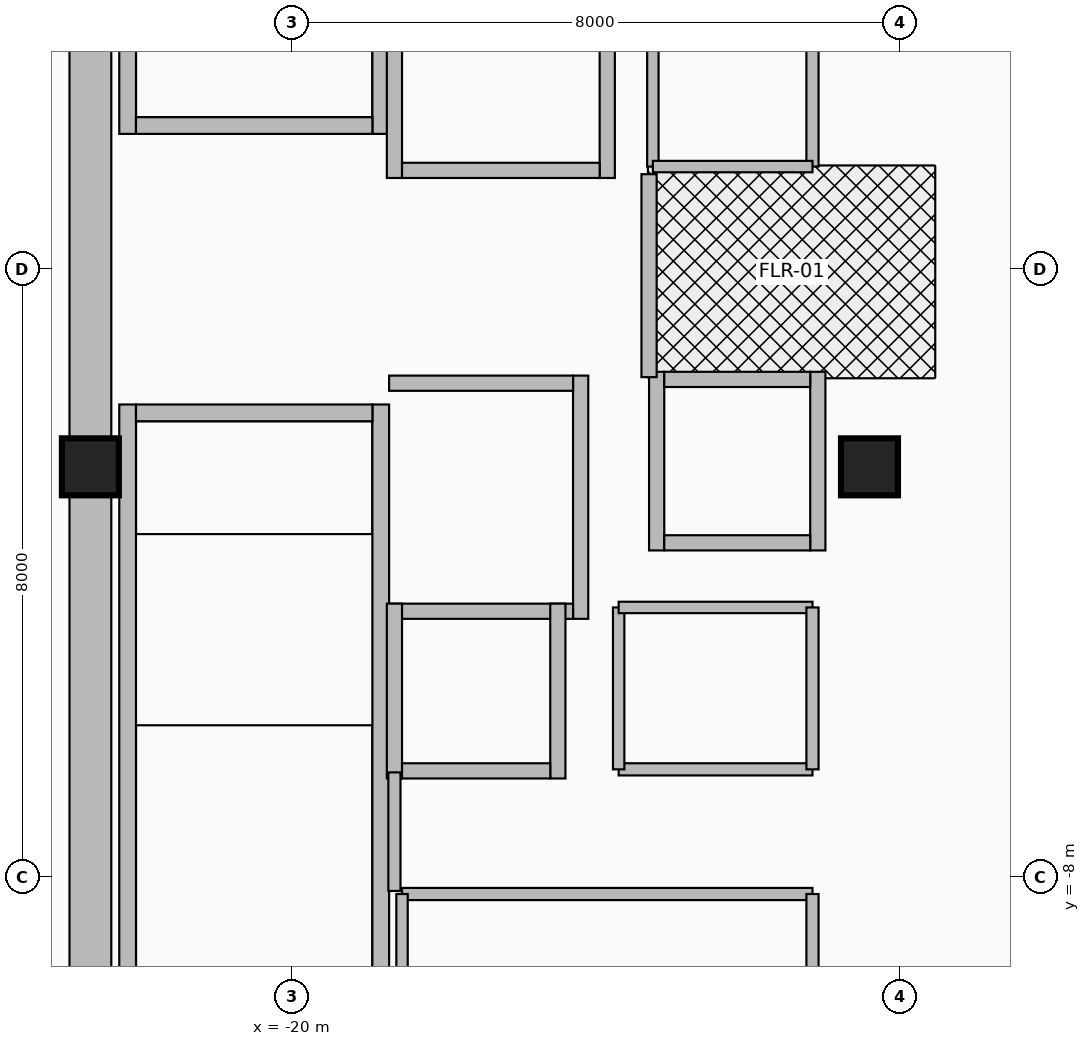
"""IFC4 building model, lengths in metres.
Left out: names, types, materials, properties, quantities, classifications, styles, units other than length and angle.
Written with IfcOpenShell. Run it as: python <this file> out.ifc"""

import sys

from ifc_helpers import new_model, si_unit, direction, frame, frame_2d, origin, origin_2d, place, context, subcontext, project, spatial, rectangle, extrude, source, transform, mapped, element, fill, save


model = new_model("IFC4")
c1 = context("Model", 3, precision=1e-05, world=origin(), true_north=direction((0.0, 1.0)))
c2 = subcontext(c1, "Body", "Model", "MODEL_VIEW")
j1 = project(units=[si_unit("LENGTHUNIT", "METRE"), si_unit("PLANEANGLEUNIT", "RADIAN")], contexts=[c1])
p1 = place(None, origin())
s1 = spatial("IfcSite", under=j1, at=p1, CompositionType="ELEMENT")
p2 = place(p1, origin())
s2 = spatial("IfcBuilding", under=s1, at=p2, CompositionType="ELEMENT")
p3 = place(p2, frame((0.0, 0.0, 290.6)))
s3 = spatial("IfcBuildingStorey", under=s2, at=p3, CompositionType="ELEMENT", Elevation=290.6)
for number, where, z_axis, x_axis in (
    (1, (-22.16, 1.78, 0.0), (0.0, 0.0, 1.0), (0.0, 1.0, 0.0)),
    (2, (-18.83, 1.78, 0.0), (0.0, 0.0, 1.0), (0.0, 1.0, 0.0)),
):
    element("IfcWall", number, at=place(p3, frame(where, z_axis=z_axis, x_axis=x_axis)), inside=s3, PredefinedType="SHEAR", context=c2, shape_type="SweptSolid", body=[
        extrude(rectangle(XDim=8.745, YDim=0.22, at=frame_2d((4.373, 0.0))), origin(), (0.0, 0.0, 1.0), 3.36),
    ])
p4 = place(p3, frame((-22.05, 1.89, 0.0), z_axis=(0.0, 0.0, 1.0), x_axis=(1.0, 0.0, 0.0)))
e3 = element("IfcWall", 3, at=p4, inside=s3, PredefinedType="SHEAR", context=c2, shape_type="SweptSolid", body=[
    extrude(rectangle(XDim=3.11, YDim=0.22, at=frame_2d((1.555, 0.0))), origin(), (0.0, 0.0, 1.0), 3.36),
])
p5 = place(p4, frame((1.0, 0.0, 0.0)))
e4 = element("IfcOpeningElement", 4, at=p5, cuts=e3, PredefinedType="OPENING", context=c2, shape_type="SweptSolid", body=[
    extrude(rectangle(XDim=1.1, YDim=2.15, at=frame_2d((0.55, 1.075))), frame((0.0, 0.125, 0.0), z_axis=(0.0, -1.0, 0.0), x_axis=(1.0, 0.0, 0.0)), (0.0, 0.0, 1.0), 0.25),
])
for number, where, z_axis, x_axis in (
    (5, (-22.16, -10.525, 0.0), (0.0, 0.0, 1.0), (0.0, 1.0, 0.0)),
    (6, (-18.83, -10.525, 0.0), (0.0, 0.0, 1.0), (0.0, 1.0, 0.0)),
):
    element("IfcWall", number, at=place(p3, frame(where, z_axis=z_axis, x_axis=x_axis)), inside=s3, PredefinedType="SHEAR", context=c2, shape_type="SweptSolid", body=[
        extrude(rectangle(XDim=8.745, YDim=0.22, at=frame_2d((4.373, 0.0))), origin(), (0.0, 0.0, 1.0), 3.36),
    ])
p6 = place(p3, frame((-22.05, -1.89, 0.0), z_axis=(0.0, 0.0, 1.0), x_axis=(1.0, 0.0, 0.0)))
e7 = element("IfcWall", 7, at=p6, inside=s3, PredefinedType="SHEAR", context=c2, shape_type="SweptSolid", body=[
    extrude(rectangle(XDim=3.11, YDim=0.22, at=frame_2d((1.555, 0.0))), origin(), (0.0, 0.0, 1.0), 3.36),
])
p7 = place(p6, frame((1.0, 0.0, 0.0)))
e8 = element("IfcOpeningElement", 8, at=p7, cuts=e7, PredefinedType="OPENING", context=c2, shape_type="SweptSolid", body=[
    extrude(rectangle(XDim=1.1, YDim=2.15, at=frame_2d((0.55, 1.075))), frame((0.0, 0.125, 0.0), z_axis=(0.0, -1.0, 0.0), x_axis=(1.0, 0.0, 0.0)), (0.0, 0.0, 1.0), 0.25),
])
p8 = place(p3, frame((-22.65, -11.075, 0.0), z_axis=(0.0, 0.0, 1.0), x_axis=(0.0, 1.0, 0.0)))
e9 = element("IfcWall", 9, at=p8, inside=s3, PredefinedType="SHEAR", context=c2, shape_type="SweptSolid", body=[
    extrude(rectangle(XDim=22.15, YDim=0.55, at=frame_2d((11.075, 0.0))), origin(), (0.0, 0.0, 1.0), 3.36),
])
m1 = source(origin(), c2, "Body", "SweptSolid", [
    extrude(rectangle(XDim=0.75, YDim=0.75, at=origin_2d()), origin(), (0.0, 0.0, 1.0), 3.6),
])
for number, where, z_axis, x_axis in (
    (10, (-22.65, -2.6, 0.0), (0.0, 0.0, 1.0), (1.0, 0.0, 0.0)),
    (11, (-12.4, -2.6, 0.0), (0.0, 0.0, 1.0), (1.0, 0.0, 0.0)),
):
    element("IfcColumn", number, at=place(p3, frame(where, z_axis=z_axis, x_axis=x_axis)), inside=s3, PredefinedType="COLUMN", context=c2, shape_type="MappedRepresentation", body=[
        mapped(m1, transform((0.0, 0.0, 0.0), x_axis=(1.0, 0.0, 0.0), y_axis=(0.0, 1.0, 0.0), z_axis=(0.0, 0.0, 1.0), scale=1.0)),
    ])
for number, where, z_axis, x_axis in (
    (12, (-18.65, 1.2, 0.0), (0.0, 0.0, 1.0), (0.0, 1.0, 0.0)),
    (13, (-15.85, 1.2, 0.0), (0.0, 0.0, 1.0), (0.0, 1.0, 0.0)),
):
    element("IfcWall", number, at=place(p3, frame(where, z_axis=z_axis, x_axis=x_axis)), inside=s3, PredefinedType="MOVABLE", context=c2, shape_type="SweptSolid", body=[
        extrude(rectangle(XDim=3.225, YDim=0.2, at=frame_2d((1.613, 0.0))), origin(), (0.0, 0.0, 1.0), 3.36),
    ])
p9 = place(p3, frame((-18.55, 1.3, 0.0), z_axis=(0.0, 0.0, 1.0), x_axis=(1.0, 0.0, 0.0)))
e14 = element("IfcWall", 14, at=p9, inside=s3, PredefinedType="MOVABLE", context=c2, shape_type="SweptSolid", body=[
    extrude(rectangle(XDim=2.6, YDim=0.2, at=frame_2d((1.3, 0.0))), origin(), (0.0, 0.0, 1.0), 3.36),
])
p10 = place(p9, frame((0.7, 0.0, 0.0)))
e15 = element("IfcOpeningElement", 15, at=p10, cuts=e14, PredefinedType="OPENING", context=c2, shape_type="SweptSolid", body=[
    extrude(rectangle(XDim=1.2, YDim=2.1, at=frame_2d((0.6, 1.05))), frame((0.0, 0.115, 0.0), z_axis=(0.0, -1.0, 0.0), x_axis=(1.0, 0.0, 0.0)), (0.0, 0.0, 1.0), 0.23),
])
p11 = place(p3, frame((-16.2, -4.6, 0.0), z_axis=(0.0, 0.0, 1.0), x_axis=(0.0, 1.0, 0.0)))
e16 = element("IfcWall", 16, at=p11, inside=s3, PredefinedType="MOVABLE", context=c2, shape_type="SweptSolid", body=[
    extrude(rectangle(XDim=3.2, YDim=0.2, at=frame_2d((1.6, 0.0))), origin(), (0.0, 0.0, 1.0), 3.36),
])
p12 = place(p3, frame((-18.72, -4.5, 0.0), z_axis=(0.0, 0.0, 1.0), x_axis=(1.0, 0.0, 0.0)))
e17 = element("IfcWall", 17, at=p12, inside=s3, PredefinedType="MOVABLE", context=c2, shape_type="SweptSolid", body=[
    extrude(rectangle(XDim=2.42, YDim=0.2, at=frame_2d((1.21, 0.0))), origin(), (0.0, 0.0, 1.0), 3.36),
])
p13 = place(p3, frame((-18.72, -1.5, 0.0), z_axis=(0.0, 0.0, 1.0), x_axis=(1.0, 0.0, 0.0)))
e18 = element("IfcWall", 18, at=p13, inside=s3, PredefinedType="MOVABLE", context=c2, shape_type="SweptSolid", body=[
    extrude(rectangle(XDim=2.42, YDim=0.2, at=frame_2d((1.21, 0.0))), origin(), (0.0, 0.0, 1.0), 3.36),
])
p14 = place(p13, frame((0.61, 0.0, 0.0)))
e19 = element("IfcOpeningElement", 19, at=p14, cuts=e18, PredefinedType="OPENING", context=c2, shape_type="SweptSolid", body=[
    extrude(rectangle(XDim=1.2, YDim=2.1, at=frame_2d((0.6, 1.05))), frame((0.0, 0.115, 0.0), z_axis=(0.0, -1.0, 0.0), x_axis=(1.0, 0.0, 0.0)), (0.0, 0.0, 1.0), 0.23),
])
for number, where, z_axis, x_axis in (
    (20, (-18.65, -6.7, 0.0), (0.0, 0.0, 1.0), (0.0, 1.0, 0.0)),
    (21, (-16.5, -6.7, 0.0), (0.0, 0.0, 1.0), (0.0, 1.0, 0.0)),
):
    element("IfcWall", number, at=place(p3, frame(where, z_axis=z_axis, x_axis=x_axis)), inside=s3, PredefinedType="MOVABLE", context=c2, shape_type="SweptSolid", body=[
        extrude(rectangle(XDim=2.3, YDim=0.2, at=frame_2d((1.15, 0.0))), origin(), (0.0, 0.0, 1.0), 3.36),
    ])
p15 = place(p3, frame((-18.55, -6.6, 0.0), z_axis=(0.0, 0.0, 1.0), x_axis=(1.0, 0.0, 0.0)))
e22 = element("IfcWall", 22, at=p15, inside=s3, PredefinedType="MOVABLE", context=c2, shape_type="SweptSolid", body=[
    extrude(rectangle(XDim=1.95, YDim=0.2, at=frame_2d((0.975, 0.0))), origin(), (0.0, 0.0, 1.0), 3.36),
])
p16 = place(p15, frame((0.425, 0.0, 0.0)))
e23 = element("IfcOpeningElement", 23, at=p16, cuts=e22, PredefinedType="OPENING", context=c2, shape_type="SweptSolid", body=[
    extrude(rectangle(XDim=1.1, YDim=2.1, at=frame_2d((0.55, 1.05))), frame((0.0, 0.115, 0.0), z_axis=(0.0, -1.0, 0.0), x_axis=(1.0, 0.0, 0.0)), (0.0, 0.0, 1.0), 0.23),
])
for number, where, z_axis, x_axis in (
    (24, (-15.2, -3.7, 0.0), (0.0, 0.0, 1.0), (0.0, 1.0, 0.0)),
    (25, (-13.08, -3.7, 0.0), (0.0, 0.0, 1.0), (0.0, 1.0, 0.0)),
):
    element("IfcWall", number, at=place(p3, frame(where, z_axis=z_axis, x_axis=x_axis)), inside=s3, PredefinedType="MOVABLE", context=c2, shape_type="SweptSolid", body=[
        extrude(rectangle(XDim=2.35, YDim=0.2, at=frame_2d((1.175, 0.0))), origin(), (0.0, 0.0, 1.0), 3.36),
    ])
p17 = place(p3, frame((-15.1, -3.6, 0.0), z_axis=(0.0, 0.0, 1.0), x_axis=(1.0, 0.0, 0.0)))
e26 = element("IfcWall", 26, at=p17, inside=s3, PredefinedType="MOVABLE", context=c2, shape_type="SweptSolid", body=[
    extrude(rectangle(XDim=1.92, YDim=0.2, at=frame_2d((0.96, 0.0))), origin(), (0.0, 0.0, 1.0), 3.36),
])
p18 = place(p3, frame((-15.1, -1.45, 0.0), z_axis=(0.0, 0.0, 1.0), x_axis=(1.0, 0.0, 0.0)))
e27 = element("IfcWall", 27, at=p18, inside=s3, PredefinedType="MOVABLE", context=c2, shape_type="SweptSolid", body=[
    extrude(rectangle(XDim=1.92, YDim=0.2, at=frame_2d((0.96, 0.0))), origin(), (0.0, 0.0, 1.0), 3.36),
])
p19 = place(p18, frame((0.41, 0.0, 0.0)))
e28 = element("IfcOpeningElement", 28, at=p19, cuts=e27, PredefinedType="OPENING", context=c2, shape_type="SweptSolid", body=[
    extrude(rectangle(XDim=1.1, YDim=2.1, at=frame_2d((0.55, 1.05))), frame((0.0, 0.115, 0.0), z_axis=(0.0, -1.0, 0.0), x_axis=(1.0, 0.0, 0.0)), (0.0, 0.0, 1.0), 0.23),
])
p20 = place(p3, frame((-15.3, -1.42, 0.0), z_axis=(0.0, 0.0, 1.0), x_axis=(0.0, 1.0, 0.0)))
e29 = element("IfcWall", 29, at=p20, inside=s3, PredefinedType="PARTITIONING", context=c2, shape_type="SweptSolid", body=[
    extrude(rectangle(XDim=2.67, YDim=0.2, at=frame_2d((1.335, 0.0))), origin(), (0.0, 0.0, 1.0), 3.36),
])
p21 = place(p20, frame((0.78, 0.0, 0.0)))
e30 = element("IfcOpeningElement", 30, at=p21, cuts=e29, PredefinedType="OPENING", context=c2, shape_type="SweptSolid", body=[
    extrude(rectangle(XDim=1.05, YDim=2.15, at=frame_2d((0.525, 1.075))), frame((0.0, 0.115, 0.0), z_axis=(0.0, -1.0, 0.0), x_axis=(1.0, 0.0, 0.0)), (0.0, 0.0, 1.0), 0.23),
])
p22 = place(p3, frame((-18.65, -8.18, 0.0), z_axis=(0.0, 0.0, 1.0), x_axis=(0.0, 1.0, 0.0)))
e31 = element("IfcWall", 31, at=p22, inside=s3, PredefinedType="PARTITIONING", context=c2, shape_type="SweptSolid", body=[
    extrude(rectangle(XDim=1.56, YDim=0.16, at=frame_2d((0.78, 0.0))), origin(), (0.0, 0.0, 1.0), 3.36),
])
p23 = place(p3, frame((-18.55, -8.22, 0.0), z_axis=(0.0, 0.0, 1.0), x_axis=(1.0, 0.0, 0.0)))
e32 = element("IfcWall", 32, at=p23, inside=s3, PredefinedType="PARTITIONING", context=c2, shape_type="SweptSolid", body=[
    extrude(rectangle(XDim=5.4, YDim=0.16, at=frame_2d((2.7, 0.0))), origin(), (0.0, 0.0, 1.0), 3.36),
])
p24 = place(p23, frame((1.15, 0.0, 0.0)))
e33 = element("IfcOpeningElement", 33, at=p24, cuts=e32, PredefinedType="OPENING", context=c2, shape_type="SweptSolid", body=[
    extrude(rectangle(XDim=0.95, YDim=2.15, at=frame_2d((0.475, 1.075))), frame((0.0, 0.095, 0.0), z_axis=(0.0, -1.0, 0.0), x_axis=(1.0, 0.0, 0.0)), (0.0, 0.0, 1.0), 0.19),
])
p25 = place(p3, frame((-18.55, -10.35, 0.0), z_axis=(0.0, 0.0, 1.0), x_axis=(0.0, 1.0, 0.0)))
e34 = element("IfcWall", 34, at=p25, inside=s3, PredefinedType="PARTITIONING", context=c2, shape_type="SweptSolid", body=[
    extrude(rectangle(XDim=2.13, YDim=0.15, at=frame_2d((1.065, 0.0))), origin(), (0.0, 0.0, 1.0), 3.36),
])
p26 = place(p3, frame((-13.15, -10.35, 0.0), z_axis=(0.0, 0.0, 1.0), x_axis=(0.0, 1.0, 0.0)))
e35 = element("IfcWall", 35, at=p26, inside=s3, PredefinedType="PARTITIONING", context=c2, shape_type="SweptSolid", body=[
    extrude(rectangle(XDim=2.13, YDim=0.16, at=frame_2d((1.065, 0.0))), origin(), (0.0, 0.0, 1.0), 3.36),
])
p27 = place(p3, frame((-15.7, -6.58, 0.0), z_axis=(0.0, 0.0, 1.0), x_axis=(1.0, 0.0, 0.0)))
e36 = element("IfcWall", 36, at=p27, inside=s3, PredefinedType="PARTITIONING", context=c2, shape_type="SweptSolid", body=[
    extrude(rectangle(XDim=2.55, YDim=0.16, at=frame_2d((1.275, 0.0))), origin(), (0.0, 0.0, 1.0), 3.36),
])
p28 = place(p27, frame((0.5, 0.0, 0.0)))
e37 = element("IfcOpeningElement", 37, at=p28, cuts=e36, PredefinedType="OPENING", context=c2, shape_type="SweptSolid", body=[
    extrude(rectangle(XDim=0.85, YDim=2.05, at=frame_2d((0.425, 1.025))), frame((0.0, 0.095, 0.0), z_axis=(0.0, -1.0, 0.0), x_axis=(1.0, 0.0, 0.0)), (0.0, 0.0, 1.0), 0.19),
])
p29 = place(p3, frame((-15.7, -6.58, 0.0), z_axis=(0.0, 0.0, 1.0), x_axis=(0.0, 1.0, 0.0)))
e38 = element("IfcWall", 38, at=p29, inside=s3, PredefinedType="PARTITIONING", context=c2, shape_type="SweptSolid", body=[
    extrude(rectangle(XDim=2.13, YDim=0.15, at=frame_2d((1.065, 0.0))), origin(), (0.0, 0.0, 1.0), 3.36),
])
p30 = place(p3, frame((-15.7, -4.45, 0.0), z_axis=(0.0, 0.0, 1.0), x_axis=(1.0, 0.0, 0.0)))
e39 = element("IfcWall", 39, at=p30, inside=s3, PredefinedType="PARTITIONING", context=c2, shape_type="SweptSolid", body=[
    extrude(rectangle(XDim=2.55, YDim=0.15, at=frame_2d((1.275, 0.0))), origin(), (0.0, 0.0, 1.0), 3.36),
])
p31 = place(p3, frame((-13.15, -6.58, 0.0), z_axis=(0.0, 0.0, 1.0), x_axis=(0.0, 1.0, 0.0)))
e40 = element("IfcWall", 40, at=p31, inside=s3, PredefinedType="PARTITIONING", context=c2, shape_type="SweptSolid", body=[
    extrude(rectangle(XDim=2.13, YDim=0.16, at=frame_2d((1.065, 0.0))), origin(), (0.0, 0.0, 1.0), 3.36),
])
p32 = place(p3, frame((-13.15, 1.35, 0.0), z_axis=(0.0, 0.0, 1.0), x_axis=(0.0, 1.0, 0.0)))
e41 = element("IfcWall", 41, at=p32, inside=s3, PredefinedType="PARTITIONING", context=c2, shape_type="SweptSolid", body=[
    extrude(rectangle(XDim=1.95, YDim=0.16, at=frame_2d((0.975, 0.0))), origin(), (0.0, 0.0, 1.0), 3.36),
])
p33 = place(p3, frame((-15.25, 1.35, 0.0), z_axis=(0.0, 0.0, 1.0), x_axis=(0.0, 1.0, 0.0)))
e42 = element("IfcWall", 42, at=p33, inside=s3, PredefinedType="PARTITIONING", context=c2, shape_type="SweptSolid", body=[
    extrude(rectangle(XDim=1.95, YDim=0.15, at=frame_2d((0.975, 0.0))), origin(), (0.0, 0.0, 1.0), 3.36),
])
p34 = place(p3, frame((-15.25, 1.35, 0.0), z_axis=(0.0, 0.0, 1.0), x_axis=(1.0, 0.0, 0.0)))
e43 = element("IfcWall", 43, at=p34, inside=s3, PredefinedType="PARTITIONING", context=c2, shape_type="SweptSolid", body=[
    extrude(rectangle(XDim=2.1, YDim=0.15, at=frame_2d((1.05, 0.0))), origin(), (0.0, 0.0, 1.0), 3.36),
])
p35 = place(p34, frame((0.3, 0.0, 0.0)))
e44 = element("IfcOpeningElement", 44, at=p35, cuts=e43, PredefinedType="OPENING", context=c2, shape_type="SweptSolid", body=[
    extrude(rectangle(XDim=0.85, YDim=2.05, at=frame_2d((0.425, 1.025))), frame((0.0, 0.09, 0.0), z_axis=(0.0, -1.0, 0.0), x_axis=(1.0, 0.0, 0.0)), (0.0, 0.0, 1.0), 0.18),
])
p36 = place(p10, origin())
e45 = element("IfcDoor", 45, at=p36, inside=s3, OperationType="DOUBLE_DOOR_SLIDING", PredefinedType="DOOR", context=c2, shape_type="SweptSolid", body=[
    extrude(rectangle(XDim=1.2, YDim=2.1, at=frame_2d((0.6, 1.05))), frame((0.0, 0.025, 0.0), z_axis=(0.0, -1.0, 0.0), x_axis=(1.0, 0.0, 0.0)), (0.0, 0.0, 1.0), 0.05),
])
fill(e15, e45)
p37 = place(p14, origin())
e46 = element("IfcDoor", 46, at=p37, inside=s3, OperationType="DOUBLE_DOOR_SLIDING", PredefinedType="DOOR", context=c2, shape_type="SweptSolid", body=[
    extrude(rectangle(XDim=1.2, YDim=2.1, at=frame_2d((0.6, 1.05))), frame((0.0, 0.025, 0.0), z_axis=(0.0, -1.0, 0.0), x_axis=(1.0, 0.0, 0.0)), (0.0, 0.0, 1.0), 0.05),
])
fill(e19, e46)
p38 = place(p16, origin())
e47 = element("IfcDoor", 47, at=p38, inside=s3, OperationType="DOUBLE_DOOR_SLIDING", PredefinedType="DOOR", context=c2, shape_type="SweptSolid", body=[
    extrude(rectangle(XDim=1.1, YDim=2.1, at=frame_2d((0.55, 1.05))), frame((0.0, 0.025, 0.0), z_axis=(0.0, -1.0, 0.0), x_axis=(1.0, 0.0, 0.0)), (0.0, 0.0, 1.0), 0.05),
])
fill(e23, e47)
p39 = place(p19, origin())
e48 = element("IfcDoor", 48, at=p39, inside=s3, OperationType="DOUBLE_DOOR_SLIDING", PredefinedType="DOOR", context=c2, shape_type="SweptSolid", body=[
    extrude(rectangle(XDim=1.1, YDim=2.1, at=frame_2d((0.55, 1.05))), frame((0.0, 0.025, 0.0), z_axis=(0.0, -1.0, 0.0), x_axis=(1.0, 0.0, 0.0)), (0.0, 0.0, 1.0), 0.05),
])
fill(e28, e48)
p40 = place(p21, origin())
e49 = element("IfcDoor", 49, at=p40, inside=s3, OperationType="SINGLE_SWING_RIGHT", PredefinedType="DOOR", context=c2, shape_type="SweptSolid", body=[
    extrude(rectangle(XDim=1.05, YDim=2.15, at=frame_2d((0.525, 1.075))), frame((0.0, 0.025, 0.0), z_axis=(0.0, -1.0, 0.0), x_axis=(1.0, 0.0, 0.0)), (0.0, 0.0, 1.0), 0.05),
])
fill(e30, e49)
p41 = place(p5, frame((1.1, 0.0, 0.0), z_axis=(0.0, 0.0, 1.0), x_axis=(-1.0, 0.0, 0.0)))
e50 = element("IfcDoor", 50, at=p41, inside=s3, OperationType="SINGLE_SWING_LEFT", PredefinedType="DOOR", context=c2, shape_type="SweptSolid", body=[
    extrude(rectangle(XDim=1.1, YDim=2.15, at=frame_2d((0.55, 1.075))), frame((0.0, 0.025, 0.0), z_axis=(0.0, -1.0, 0.0), x_axis=(1.0, 0.0, 0.0)), (0.0, 0.0, 1.0), 0.05),
])
fill(e4, e50)
p42 = place(p7, origin())
e51 = element("IfcDoor", 51, at=p42, inside=s3, OperationType="SINGLE_SWING_RIGHT", PredefinedType="DOOR", context=c2, shape_type="SweptSolid", body=[
    extrude(rectangle(XDim=1.1, YDim=2.15, at=frame_2d((0.55, 1.075))), frame((0.0, 0.025, 0.0), z_axis=(0.0, -1.0, 0.0), x_axis=(1.0, 0.0, 0.0)), (0.0, 0.0, 1.0), 0.05),
])
fill(e8, e51)
p43 = place(p24, origin())
e52 = element("IfcDoor", 52, at=p43, inside=s3, OperationType="SINGLE_SWING_LEFT", PredefinedType="DOOR", context=c2, shape_type="SweptSolid", body=[
    extrude(rectangle(XDim=0.95, YDim=2.15, at=frame_2d((0.475, 1.075))), frame((0.0, 0.025, 0.0), z_axis=(0.0, -1.0, 0.0), x_axis=(1.0, 0.0, 0.0)), (0.0, 0.0, 1.0), 0.05),
])
fill(e33, e52)
p44 = place(p28, origin())
e53 = element("IfcDoor", 53, at=p44, inside=s3, OperationType="SINGLE_SWING_RIGHT", PredefinedType="DOOR", context=c2, shape_type="SweptSolid", body=[
    extrude(rectangle(XDim=0.85, YDim=2.05, at=frame_2d((0.425, 1.025))), frame((0.0, 0.025, 0.0), z_axis=(0.0, -1.0, 0.0), x_axis=(1.0, 0.0, 0.0)), (0.0, 0.0, 1.0), 0.05),
])
fill(e37, e53)
p45 = place(p35, origin())
e54 = element("IfcDoor", 54, at=p45, inside=s3, OperationType="SINGLE_SWING_LEFT", PredefinedType="DOOR", context=c2, shape_type="SweptSolid", body=[
    extrude(rectangle(XDim=0.85, YDim=2.05, at=frame_2d((0.425, 1.025))), frame((0.0, 0.025, 0.0), z_axis=(0.0, -1.0, 0.0), x_axis=(1.0, 0.0, 0.0)), (0.0, 0.0, 1.0), 0.05),
])
fill(e44, e54)
save(model, sys.argv[1])
